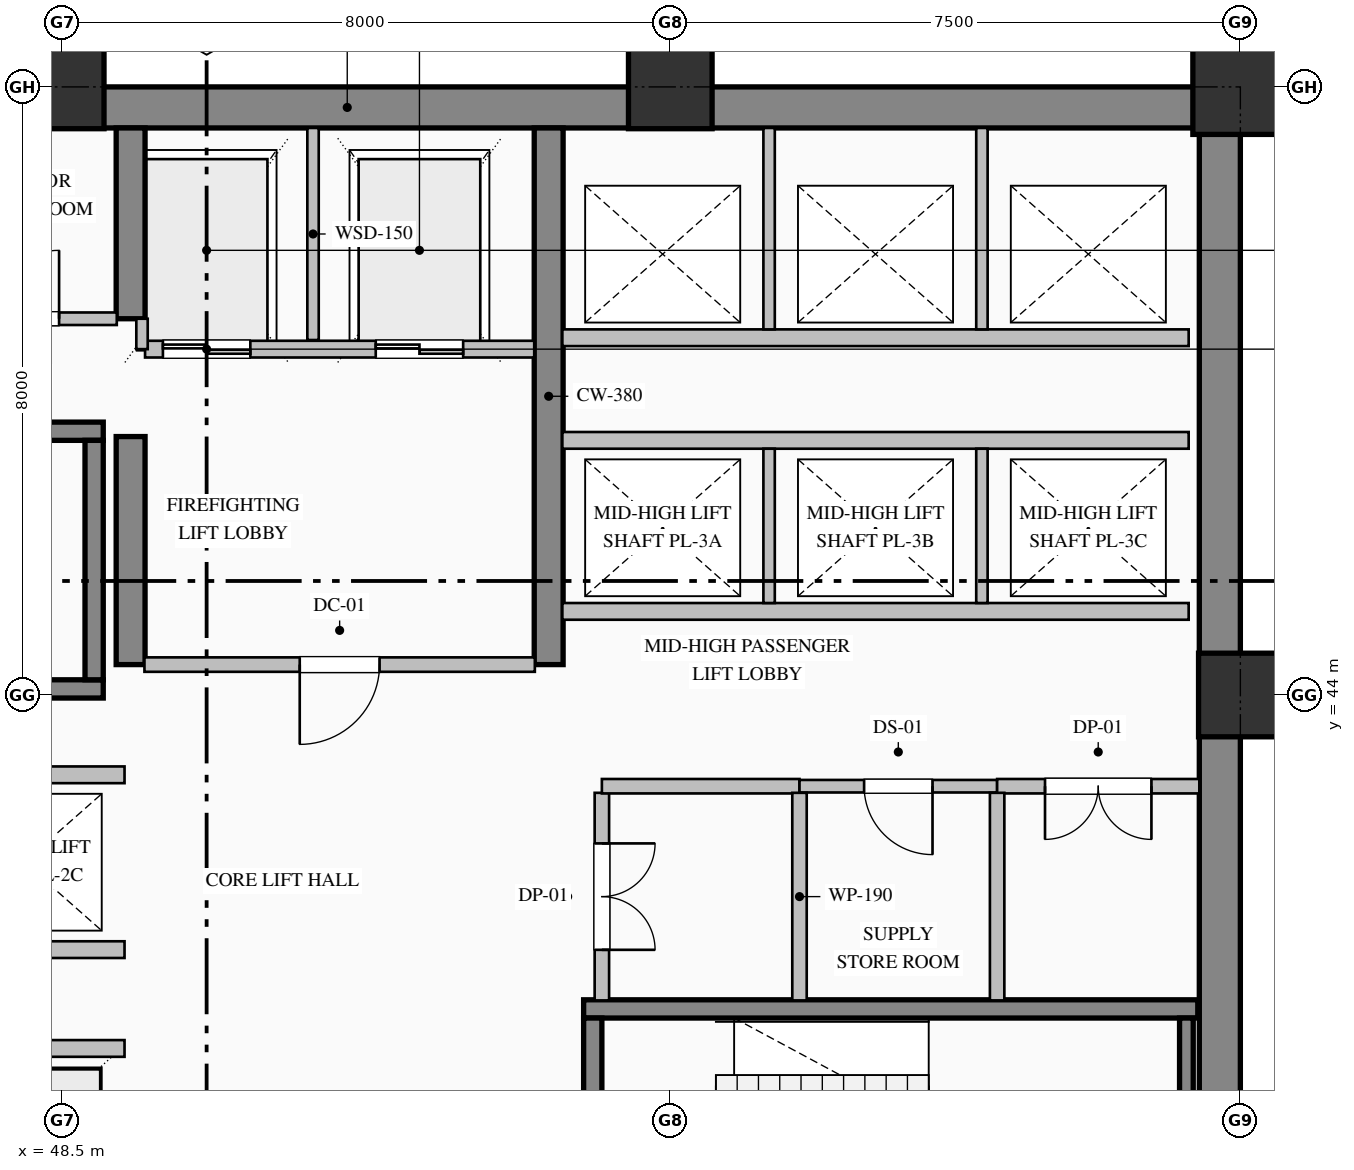
"""IFC4 building model, lengths in metres.
Left out: names, types, materials, properties, quantities, classifications, styles, units other than length and angle.
Written with IfcOpenShell. Run it as: python <this file> out.ifc"""

import sys

from ifc_helpers import new_model, si_unit, direction, frame, frame_2d, origin, origin_2d, place, context, subcontext, project, spatial, rectangle, hollow_rectangle, extrude, element, fill, save


model = new_model("IFC4")
c1 = context("Model", 3, precision=1e-05, world=origin(), true_north=direction((0.0, 1.0)))
c2 = subcontext(c1, "Body", "Model", "MODEL_VIEW")
j1 = project(units=[si_unit("LENGTHUNIT", "METRE"), si_unit("PLANEANGLEUNIT", "RADIAN")], contexts=[c1])
p1 = place(None, origin())
s1 = spatial("IfcSite", under=j1, at=p1, CompositionType="ELEMENT")
p2 = place(p1, origin())
s2 = spatial("IfcBuilding", under=s1, at=p2, CompositionType="ELEMENT")
p3 = place(p2, frame((0.0, 0.0, 92.2)))
s3 = spatial("IfcBuildingStorey", under=s2, at=p3, CompositionType="ELEMENT", Elevation=92.2)
p4 = place(p3, frame((40.5, 51.73, 0.0), z_axis=(0.0, 0.0, 1.0), x_axis=(1.0, 0.0, 0.0)))
e1 = element("IfcWall", 1, at=p4, inside=s3, PredefinedType="SHEAR", context=c2, shape_type="SweptSolid", body=[
    extrude(rectangle(XDim=23.5, YDim=0.54, at=frame_2d((11.75, 0.0))), origin(), (0.0, 0.0, 1.0), 3.75),
])
p5 = place(p3, frame((63.73, 36.32, 0.0), z_axis=(0.0, 0.0, 1.0), x_axis=(0.0, 1.0, 0.0)))
e2 = element("IfcWall", 2, at=p5, inside=s3, PredefinedType="SHEAR", context=c2, shape_type="SweptSolid", body=[
    extrude(rectangle(XDim=15.14, YDim=0.54, at=frame_2d((7.57, 0.0))), origin(), (0.0, 0.0, 1.0), 3.75),
])
p6 = place(p3, frame((49.4, 44.4, 0.0), z_axis=(0.0, 0.0, 1.0), x_axis=(0.0, 1.0, 0.0)))
e3 = element("IfcWall", 3, at=p6, inside=s3, PredefinedType="SHEAR", context=c2, shape_type="SweptSolid", body=[
    extrude(rectangle(XDim=3.0, YDim=0.38, at=frame_2d((1.5, 0.0))), origin(), (0.0, 0.0, 1.0), 3.75),
])
p7 = place(p3, frame((49.4, 48.95, 0.0), z_axis=(0.0, 0.0, 1.0), x_axis=(0.0, 1.0, 0.0)))
e4 = element("IfcWall", 4, at=p7, inside=s3, PredefinedType="SHEAR", context=c2, shape_type="SweptSolid", body=[
    extrude(rectangle(XDim=2.51, YDim=0.38, at=frame_2d((1.255, 0.0))), origin(), (0.0, 0.0, 1.0), 3.75),
])
p8 = place(p3, frame((54.9, 44.4, 0.0), z_axis=(0.0, 0.0, 1.0), x_axis=(0.0, 1.0, 0.0)))
e5 = element("IfcWall", 5, at=p8, inside=s3, PredefinedType="SHEAR", context=c2, shape_type="SweptSolid", body=[
    extrude(rectangle(XDim=7.06, YDim=0.38, at=frame_2d((3.53, 0.0))), origin(), (0.0, 0.0, 1.0), 3.75),
])
for number, where, z_axis, x_axis in (
    (6, (48.5, 52.0, 0.0), (0.0, 0.0, 1.0), (1.0, 0.0, 0.0)),
    (7, (56.5, 52.0, 0.0), (0.0, 0.0, 1.0), (1.0, 0.0, 0.0)),
    (8, (64.0, 44.0, 0.0), (0.0, 0.0, 1.0), (1.0, 0.0, 0.0)),
):
    element("IfcColumn", number, at=place(p3, frame(where, z_axis=z_axis, x_axis=x_axis)), inside=s3, PredefinedType="COLUMN", context=c2, shape_type="SweptSolid", body=[
        extrude(hollow_rectangle(XDim=1.1, YDim=1.1, WallThickness=0.04, at=origin_2d()), origin(), (0.0, 0.0, 1.0), 4.0),
    ])
p9 = place(p3, frame((64.0, 52.0, 0.0), z_axis=(0.0, 0.0, 1.0), x_axis=(1.0, 0.0, 0.0)))
e9 = element("IfcColumn", 9, at=p9, inside=s3, PredefinedType="COLUMN", context=c2, shape_type="SweptSolid", body=[
    extrude(hollow_rectangle(XDim=1.25, YDim=1.25, WallThickness=0.045, at=origin_2d()), origin(), (0.0, 0.0, 1.0), 4.0),
])
for number, where, z_axis, x_axis in (
    (10, (40.96, 47.47, 0.0), (0.0, 0.0, 1.0), (1.0, 0.0, 0.0)),
    (11, (49.04, 44.08, 0.0), (0.0, 0.0, 1.0), (-1.0, 0.0, 0.0)),
):
    element("IfcWall", number, at=place(p3, frame(where, z_axis=z_axis, x_axis=x_axis)), inside=s3, PredefinedType="SOLIDWALL", context=c2, shape_type="SweptSolid", body=[
        extrude(rectangle(XDim=8.08, YDim=0.24, at=frame_2d((4.04, 0.0))), origin(), (0.0, 0.0, 1.0), 4.0),
    ])
p10 = place(p3, frame((48.92, 44.2, 0.0), z_axis=(0.0, 0.0, 1.0), x_axis=(0.0, 1.0, 0.0)))
e12 = element("IfcWall", 12, at=p10, inside=s3, PredefinedType="SOLIDWALL", context=c2, shape_type="SweptSolid", body=[
    extrude(rectangle(XDim=3.15, YDim=0.24, at=frame_2d((1.575, 0.0))), origin(), (0.0, 0.0, 1.0), 4.0),
])
p11 = place(p3, frame((55.36, 39.87, 0.0), z_axis=(0.0, 0.0, 1.0), x_axis=(1.0, 0.0, 0.0)))
e13 = element("IfcWall", 13, at=p11, inside=s3, PredefinedType="SOLIDWALL", context=c2, shape_type="SweptSolid", body=[
    extrude(rectangle(XDim=8.08, YDim=0.24, at=frame_2d((4.04, 0.0))), origin(), (0.0, 0.0, 1.0), 4.0),
])
p12 = place(p3, frame((55.48, 39.75, 0.0), z_axis=(0.0, 0.0, 1.0), x_axis=(0.0, -1.0, 0.0)))
e14 = element("IfcWall", 14, at=p12, inside=s3, PredefinedType="SOLIDWALL", context=c2, shape_type="SweptSolid", body=[
    extrude(rectangle(XDim=3.15, YDim=0.24, at=frame_2d((1.575, 0.0))), origin(), (0.0, 0.0, 1.0), 4.0),
])
p13 = place(p12, frame((1.0, 0.0, 0.0)))
e15 = element("IfcOpeningElement", 15, at=p13, cuts=e14, PredefinedType="OPENING", context=c2, shape_type="SweptSolid", body=[
    extrude(rectangle(XDim=1.15, YDim=2.2, at=frame_2d((0.575, 1.1))), frame((0.0, 0.13, 0.0), z_axis=(0.0, -1.0, 0.0), x_axis=(1.0, 0.0, 0.0)), (0.0, 0.0, 1.0), 0.26),
])
p14 = place(p3, frame((63.29, 36.6, 0.0), z_axis=(0.0, 0.0, 1.0), x_axis=(0.0, 1.0, 0.0)))
e16 = element("IfcWall", 16, at=p14, inside=s3, PredefinedType="SOLIDWALL", context=c2, shape_type="SweptSolid", body=[
    extrude(rectangle(XDim=3.15, YDim=0.18, at=frame_2d((1.575, 0.0))), origin(), (0.0, 0.0, 1.0), 4.0),
])
p15 = place(p3, frame((54.71, 48.55, 0.0), z_axis=(0.0, 0.0, 1.0), x_axis=(-1.0, 0.0, 0.0)))
e17 = element("IfcWall", 17, at=p15, inside=s3, PredefinedType="PARTITIONING", context=c2, shape_type="SweptSolid", body=[
    extrude(rectangle(XDim=5.12, YDim=0.22, at=frame_2d((2.56, 0.0))), origin(), (0.0, 0.0, 1.0), 3.75),
])
p16 = place(p15, frame((3.735, 0.0, 0.0)))
e18 = element("IfcOpeningElement", 18, at=p16, cuts=e17, PredefinedType="OPENING", context=c2, shape_type="SweptSolid", body=[
    extrude(rectangle(XDim=1.15, YDim=2.2, at=frame_2d((0.575, 1.1))), frame((0.0, 0.12, 0.0), z_axis=(0.0, -1.0, 0.0), x_axis=(1.0, 0.0, 0.0)), (0.0, 0.0, 1.0), 0.24),
])
p17 = place(p15, frame((0.935, 0.0, 0.0)))
e19 = element("IfcOpeningElement", 19, at=p17, cuts=e17, PredefinedType="OPENING", context=c2, shape_type="SweptSolid", body=[
    extrude(rectangle(XDim=1.15, YDim=2.2, at=frame_2d((0.575, 1.1))), frame((0.0, 0.12, 0.0), z_axis=(0.0, -1.0, 0.0), x_axis=(1.0, 0.0, 0.0)), (0.0, 0.0, 1.0), 0.24),
])
p18 = place(p3, frame((51.8, 48.67, 0.0), z_axis=(0.0, 0.0, 1.0), x_axis=(0.0, 1.0, 0.0)))
e20 = element("IfcWall", 20, at=p18, inside=s3, PredefinedType="PARTITIONING", context=c2, shape_type="SweptSolid", body=[
    extrude(rectangle(XDim=2.79, YDim=0.15, at=frame_2d((1.395, 0.0))), origin(), (0.0, 0.0, 1.0), 3.75),
])
p19 = place(p3, frame((49.55, 48.55, 0.0), z_axis=(0.0, 0.0, 1.0), x_axis=(0.0, 1.0, 0.0)))
e21 = element("IfcWall", 21, at=p19, inside=s3, PredefinedType="PARTITIONING", context=c2, shape_type="SweptSolid", body=[
    extrude(rectangle(XDim=0.4, YDim=0.15, at=frame_2d((0.2, 0.0))), origin(), (0.0, 0.0, 1.0), 3.75),
])
for number, where, z_axis, x_axis in (
    (22, (41.08, 39.35, 0.0), (0.0, 0.0, 1.0), (1.0, 0.0, 0.0)),
    (23, (49.32, 40.65, 0.0), (0.0, 0.0, 1.0), (-1.0, 0.0, 0.0)),
    (24, (41.08, 42.95, 0.0), (0.0, 0.0, 1.0), (1.0, 0.0, 0.0)),
    (25, (63.32, 45.1, 0.0), (0.0, 0.0, 1.0), (-1.0, 0.0, 0.0)),
    (26, (55.08, 47.35, 0.0), (0.0, 0.0, 1.0), (1.0, 0.0, 0.0)),
):
    element("IfcWall", number, at=place(p3, frame(where, z_axis=z_axis, x_axis=x_axis)), inside=s3, PredefinedType="PARTITIONING", context=c2, shape_type="SweptSolid", body=[
        extrude(rectangle(XDim=8.24, YDim=0.22, at=frame_2d((4.12, 0.0))), origin(), (0.0, 0.0, 1.0), 3.75),
    ])
for number, where, z_axis, x_axis in (
    (27, (57.8, 45.21, 0.0), (0.0, 0.0, 1.0), (0.0, 1.0, 0.0)),
    (28, (60.6, 45.21, 0.0), (0.0, 0.0, 1.0), (0.0, 1.0, 0.0)),
):
    element("IfcWall", number, at=place(p3, frame(where, z_axis=z_axis, x_axis=x_axis)), inside=s3, PredefinedType="PARTITIONING", context=c2, shape_type="SweptSolid", body=[
        extrude(rectangle(XDim=2.03, YDim=0.15, at=frame_2d((1.015, 0.0))), origin(), (0.0, 0.0, 1.0), 3.75),
    ])
p20 = place(p3, frame((63.32, 48.7, 0.0), z_axis=(0.0, 0.0, 1.0), x_axis=(-1.0, 0.0, 0.0)))
e29 = element("IfcWall", 29, at=p20, inside=s3, PredefinedType="PARTITIONING", context=c2, shape_type="SweptSolid", body=[
    extrude(rectangle(XDim=8.24, YDim=0.22, at=frame_2d((4.12, 0.0))), origin(), (0.0, 0.0, 1.0), 3.75),
])
for number, where, z_axis, x_axis in (
    (30, (57.8, 48.81, 0.0), (0.0, 0.0, 1.0), (0.0, 1.0, 0.0)),
    (31, (60.6, 48.81, 0.0), (0.0, 0.0, 1.0), (0.0, 1.0, 0.0)),
):
    element("IfcWall", number, at=place(p3, frame(where, z_axis=z_axis, x_axis=x_axis)), inside=s3, PredefinedType="PARTITIONING", context=c2, shape_type="SweptSolid", body=[
        extrude(rectangle(XDim=2.65, YDim=0.15, at=frame_2d((1.325, 0.0))), origin(), (0.0, 0.0, 1.0), 3.75),
    ])
p21 = place(p3, frame((46.8, 48.95, 0.0), z_axis=(0.0, 0.0, 1.0), x_axis=(1.0, 0.0, 0.0)))
e32 = element("IfcWall", 32, at=p21, inside=s3, PredefinedType="PARTITIONING", context=c2, shape_type="SweptSolid", body=[
    extrude(rectangle(XDim=2.418, YDim=0.165, at=frame_2d((1.209, 0.0))), origin(), (0.0, 0.0, 1.0), 3.75),
])
p22 = place(p21, frame((0.759, 0.0, 0.0)))
e33 = element("IfcOpeningElement", 33, at=p22, cuts=e32, PredefinedType="OPENING", context=c2, shape_type="SweptSolid", body=[
    extrude(rectangle(XDim=0.9, YDim=2.15, at=frame_2d((0.45, 1.075))), frame((0.0, 0.093, 0.0), z_axis=(0.0, -1.0, 0.0), x_axis=(1.0, 0.0, 0.0)), (0.0, 0.0, 1.0), 0.185),
])
p23 = place(p3, frame((54.718, 44.4, 0.0), z_axis=(0.0, 0.0, 1.0), x_axis=(-1.0, 0.0, 0.0)))
e34 = element("IfcWall", 34, at=p23, inside=s3, PredefinedType="PARTITIONING", context=c2, shape_type="SweptSolid", body=[
    extrude(rectangle(XDim=5.136, YDim=0.19, at=frame_2d((2.568, 0.0))), origin(), (0.0, 0.0, 1.0), 3.75),
])
p24 = place(p23, frame((2.043, 0.0, 0.0)))
e35 = element("IfcOpeningElement", 35, at=p24, cuts=e34, PredefinedType="OPENING", context=c2, shape_type="SweptSolid", body=[
    extrude(rectangle(XDim=1.05, YDim=2.15, at=frame_2d((0.525, 1.075))), frame((0.0, 0.105, 0.0), z_axis=(0.0, -1.0, 0.0), x_axis=(1.0, 0.0, 0.0)), (0.0, 0.0, 1.0), 0.21),
])
p25 = place(p3, frame((55.6, 42.713, 0.0), z_axis=(0.0, 0.0, 1.0), x_axis=(0.0, -1.0, 0.0)))
e36 = element("IfcWall", 36, at=p25, inside=s3, PredefinedType="PARTITIONING", context=c2, shape_type="SweptSolid", body=[
    extrude(rectangle(XDim=2.731, YDim=0.19, at=frame_2d((1.365, 0.0))), origin(), (0.0, 0.0, 1.0), 3.75),
])
p26 = place(p25, frame((0.666, 0.0, 0.0)))
e37 = element("IfcOpeningElement", 37, at=p26, cuts=e36, PredefinedType="OPENING", context=c2, shape_type="SweptSolid", body=[
    extrude(rectangle(XDim=1.4, YDim=2.25, at=frame_2d((0.7, 1.125))), frame((0.0, 0.105, 0.0), z_axis=(0.0, -1.0, 0.0), x_axis=(1.0, 0.0, 0.0)), (0.0, 0.0, 1.0), 0.21),
])
p27 = place(p3, frame((58.2, 42.8, 0.0), z_axis=(0.0, 0.0, 1.0), x_axis=(-1.0, 0.0, 0.0)))
e38 = element("IfcWall", 38, at=p27, inside=s3, PredefinedType="PARTITIONING", context=c2, shape_type="SweptSolid", body=[
    extrude(rectangle(XDim=2.6, YDim=0.19, at=frame_2d((1.3, 0.0))), origin(), (0.0, 0.0, 1.0), 3.75),
])
p28 = place(p3, frame((60.8, 42.8, 0.0), z_axis=(0.0, 0.0, 1.0), x_axis=(-1.0, 0.0, 0.0)))
e39 = element("IfcWall", 39, at=p28, inside=s3, PredefinedType="PARTITIONING", context=c2, shape_type="SweptSolid", body=[
    extrude(rectangle(XDim=2.6, YDim=0.165, at=frame_2d((1.3, 0.0))), origin(), (0.0, 0.0, 1.0), 3.75),
])
p29 = place(p28, frame((0.85, 0.0, 0.0)))
e40 = element("IfcOpeningElement", 40, at=p29, cuts=e39, PredefinedType="OPENING", context=c2, shape_type="SweptSolid", body=[
    extrude(rectangle(XDim=0.9, YDim=2.15, at=frame_2d((0.45, 1.075))), frame((0.0, 0.093, 0.0), z_axis=(0.0, -1.0, 0.0), x_axis=(1.0, 0.0, 0.0)), (0.0, 0.0, 1.0), 0.185),
])
p30 = place(p3, frame((63.46, 42.8, 0.0), z_axis=(0.0, 0.0, 1.0), x_axis=(-1.0, 0.0, 0.0)))
e41 = element("IfcWall", 41, at=p30, inside=s3, PredefinedType="PARTITIONING", context=c2, shape_type="SweptSolid", body=[
    extrude(rectangle(XDim=2.66, YDim=0.19, at=frame_2d((1.33, 0.0))), origin(), (0.0, 0.0, 1.0), 3.75),
])
p31 = place(p30, frame((0.63, 0.0, 0.0)))
e42 = element("IfcOpeningElement", 42, at=p31, cuts=e41, PredefinedType="OPENING", context=c2, shape_type="SweptSolid", body=[
    extrude(rectangle(XDim=1.4, YDim=2.25, at=frame_2d((0.7, 1.125))), frame((0.0, 0.105, 0.0), z_axis=(0.0, -1.0, 0.0), x_axis=(1.0, 0.0, 0.0)), (0.0, 0.0, 1.0), 0.21),
])
for number, where, z_axis, x_axis in (
    (43, (58.2, 42.713, 0.0), (0.0, 0.0, 1.0), (0.0, -1.0, 0.0)),
    (44, (60.8, 42.713, 0.0), (0.0, 0.0, 1.0), (0.0, -1.0, 0.0)),
):
    element("IfcWall", number, at=place(p3, frame(where, z_axis=z_axis, x_axis=x_axis)), inside=s3, PredefinedType="PARTITIONING", context=c2, shape_type="SweptSolid", body=[
        extrude(rectangle(XDim=2.731, YDim=0.19, at=frame_2d((1.365, 0.0))), origin(), (0.0, 0.0, 1.0), 3.75),
    ])
p32 = place(p16, origin())
e45 = element("IfcDoor", 45, at=p32, inside=s3, OperationType="DOUBLE_DOOR_SLIDING", PredefinedType="DOOR", context=c2, shape_type="SweptSolid", body=[
    extrude(rectangle(XDim=1.15, YDim=2.2, at=frame_2d((0.575, 1.1))), frame((0.0, 0.025, 0.0), z_axis=(0.0, -1.0, 0.0), x_axis=(1.0, 0.0, 0.0)), (0.0, 0.0, 1.0), 0.05),
])
fill(e18, e45)
p33 = place(p17, origin())
e46 = element("IfcDoor", 46, at=p33, inside=s3, OperationType="DOUBLE_DOOR_SLIDING", PredefinedType="DOOR", context=c2, shape_type="SweptSolid", body=[
    extrude(rectangle(XDim=1.15, YDim=2.2, at=frame_2d((0.575, 1.1))), frame((0.0, 0.025, 0.0), z_axis=(0.0, -1.0, 0.0), x_axis=(1.0, 0.0, 0.0)), (0.0, 0.0, 1.0), 0.05),
])
fill(e19, e46)
p34 = place(p24, origin())
e47 = element("IfcDoor", 47, at=p34, inside=s3, OperationType="SINGLE_SWING_RIGHT", PredefinedType="DOOR", context=c2, shape_type="SweptSolid", body=[
    extrude(rectangle(XDim=1.05, YDim=2.15, at=frame_2d((0.525, 1.075))), frame((0.0, 0.025, 0.0), z_axis=(0.0, -1.0, 0.0), x_axis=(1.0, 0.0, 0.0)), (0.0, 0.0, 1.0), 0.05),
])
fill(e35, e47)
p35 = place(p22, origin())
e48 = element("IfcDoor", 48, at=p35, inside=s3, OperationType="SINGLE_SWING_RIGHT", PredefinedType="DOOR", context=c2, shape_type="SweptSolid", body=[
    extrude(rectangle(XDim=0.9, YDim=2.15, at=frame_2d((0.45, 1.075))), frame((0.0, 0.025, 0.0), z_axis=(0.0, -1.0, 0.0), x_axis=(1.0, 0.0, 0.0)), (0.0, 0.0, 1.0), 0.05),
])
fill(e33, e48)
p36 = place(p26, origin())
e49 = element("IfcDoor", 49, at=p36, inside=s3, OperationType="DOUBLE_DOOR_SINGLE_SWING", PredefinedType="DOOR", context=c2, shape_type="SweptSolid", body=[
    extrude(rectangle(XDim=1.4, YDim=2.25, at=frame_2d((0.7, 1.125))), frame((0.0, 0.025, 0.0), z_axis=(0.0, -1.0, 0.0), x_axis=(1.0, 0.0, 0.0)), (0.0, 0.0, 1.0), 0.05),
])
fill(e37, e49)
p37 = place(p29, origin())
e50 = element("IfcDoor", 50, at=p37, inside=s3, OperationType="SINGLE_SWING_LEFT", PredefinedType="DOOR", context=c2, shape_type="SweptSolid", body=[
    extrude(rectangle(XDim=0.9, YDim=2.15, at=frame_2d((0.45, 1.075))), frame((0.0, 0.025, 0.0), z_axis=(0.0, -1.0, 0.0), x_axis=(1.0, 0.0, 0.0)), (0.0, 0.0, 1.0), 0.05),
])
fill(e40, e50)
p38 = place(p31, origin())
e51 = element("IfcDoor", 51, at=p38, inside=s3, OperationType="DOUBLE_DOOR_SINGLE_SWING", PredefinedType="DOOR", context=c2, shape_type="SweptSolid", body=[
    extrude(rectangle(XDim=1.4, YDim=2.25, at=frame_2d((0.7, 1.125))), frame((0.0, 0.025, 0.0), z_axis=(0.0, -1.0, 0.0), x_axis=(1.0, 0.0, 0.0)), (0.0, 0.0, 1.0), 0.05),
])
fill(e42, e51)
save(model, sys.argv[1])
